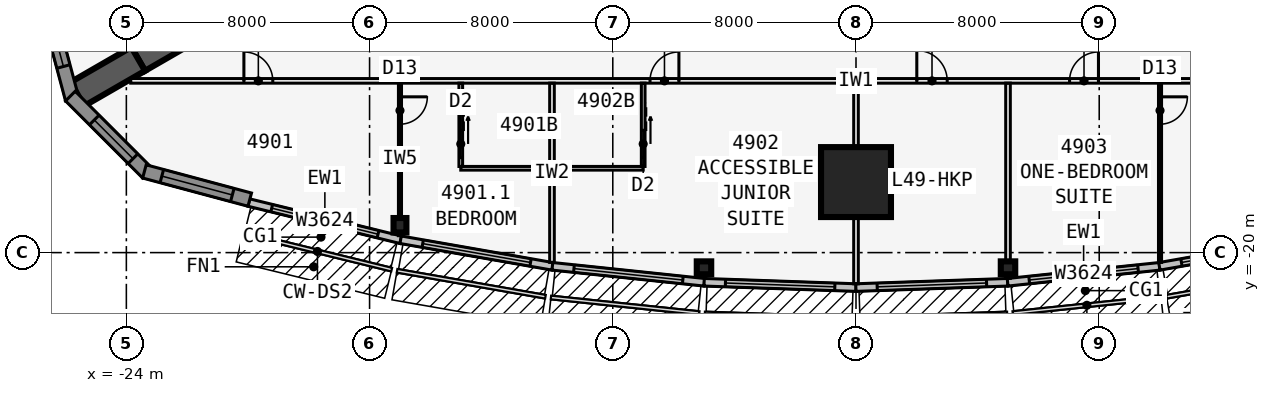
"""IFC4 building model, lengths in metres.
Left out: names, types, materials, properties, quantities, classifications, styles, units other than length and angle.
Written with IfcOpenShell. Run it as: python <this file> out.ifc"""

import sys

from ifc_helpers import new_model, si_unit, direction, frame, frame_2d, origin, origin_2d, place, context, subcontext, project, spatial, polyline, rectangle, i_section, outline, extrude, element, fill, save


model = new_model("IFC4")
c1 = context("Model", 3, precision=1e-05, world=origin(), true_north=direction((0.0, 1.0)))
c2 = subcontext(c1, "Body", "Model", "MODEL_VIEW")
j1 = project(units=[si_unit("LENGTHUNIT", "METRE"), si_unit("PLANEANGLEUNIT", "RADIAN")], contexts=[c1])
p1 = place(None, origin())
s1 = spatial("IfcSite", under=j1, at=p1, CompositionType="ELEMENT")
p2 = place(p1, origin())
s2 = spatial("IfcBuilding", under=s1, at=p2, CompositionType="ELEMENT")
p3 = place(p2, frame((0.0, 0.0, 182.7)))
s3 = spatial("IfcBuildingStorey", under=s2, at=p3, CompositionType="ELEMENT", Elevation=182.7)
for number, where, z_axis, x_axis in (
    (1, (-21.61, -12.477, 0.0), (0.0, 0.0, 1.0), (-0.866, -0.5, 0.0)),
    (2, (-23.61, -13.631, 0.0), (0.0, 0.0, 1.0), (-0.866, -0.5, 0.0)),
):
    element("IfcWall", number, at=place(p3, frame(where, z_axis=z_axis, x_axis=x_axis)), inside=s3, PredefinedType="SHEAR", context=c2, shape_type="SweptSolid", body=[
        extrude(rectangle(XDim=2.309, YDim=0.9, at=frame_2d((1.155, 0.0))), origin(), (0.0, 0.0, 1.0), 3.4),
    ])
for number, where, z_axis, x_axis in (
    (3, (-15.0, -19.1, 0.0), (0.0, 0.0, 1.0), (1.0, 0.0, 0.0)),
    (4, (-5.0, -20.5, 0.0), (0.0, 0.0, 1.0), (0.0, -1.0, 0.0)),
    (5, (5.0, -20.5, 0.0), (0.0, 0.0, 1.0), (0.0, -1.0, 0.0)),
):
    element("IfcColumn", number, at=place(p3, frame(where, z_axis=z_axis, x_axis=x_axis)), inside=s3, PredefinedType="COLUMN", context=c2, shape_type="SweptSolid", body=[
        extrude(i_section(OverallWidth=0.424, OverallDepth=0.475, WebThickness=0.048, FlangeThickness=0.077, at=origin_2d()), origin(), (0.0, 0.0, 1.0), 3.4),
    ])
p4 = place(p3, frame((0.0, -17.68, 0.0), z_axis=(0.0, 0.0, 1.0), x_axis=(0.0, -1.0, 0.0)))
e6 = element("IfcColumn", 6, at=p4, inside=s3, PredefinedType="COLUMN", context=c2, shape_type="SweptSolid", body=[
    extrude(rectangle(XDim=2.3, YDim=2.3, at=origin_2d()), origin(), (0.0, 0.0, 1.0), 3.4),
])
p5 = place(p3, frame((-19.97, -18.354, 0.0), z_axis=(0.0, 0.0, 1.0), x_axis=(0.971270024053, -0.237980126011, 0.0)))
e7 = element("IfcWall", 7, at=p5, inside=s3, PredefinedType="STANDARD", context=c2, shape_type="SweptSolid", body=[
    extrude(rectangle(XDim=5.148, YDim=0.25, at=frame_2d((2.574, 0.0))), origin(), (0.0, 0.0, 1.0), 3.235),
])
p6 = place(p5, frame((0.774, 0.0, 0.45)))
e8 = element("IfcOpeningElement", 8, at=p6, cuts=e7, PredefinedType="OPENING", context=c2, shape_type="SweptSolid", body=[
    extrude(rectangle(XDim=3.6, YDim=2.4, at=frame_2d((1.8, 1.2))), frame((0.0, 0.135, 0.0), z_axis=(0.0, -1.0, 0.0), x_axis=(1.0, 0.0, 0.0)), (0.0, 0.0, 1.0), 0.27),
])
p7 = place(p3, frame((-14.979, -19.577, 0.0), z_axis=(0.0, 0.0, 1.0), x_axis=(0.985030467156, -0.172380331752, 0.0)))
e9 = element("IfcWall", 9, at=p7, inside=s3, PredefinedType="STANDARD", context=c2, shape_type="SweptSolid", body=[
    extrude(rectangle(XDim=5.076, YDim=0.25, at=frame_2d((2.538, 0.0))), origin(), (0.0, 0.0, 1.0), 3.235),
])
p8 = place(p7, frame((0.738, 0.0, 0.45)))
e10 = element("IfcOpeningElement", 10, at=p8, cuts=e9, PredefinedType="OPENING", context=c2, shape_type="SweptSolid", body=[
    extrude(rectangle(XDim=3.6, YDim=2.4, at=frame_2d((1.8, 1.2))), frame((0.0, 0.135, 0.0), z_axis=(0.0, -1.0, 0.0), x_axis=(1.0, 0.0, 0.0)), (0.0, 0.0, 1.0), 0.27),
])
p9 = place(p3, frame((-9.987, -20.451, 0.0), z_axis=(0.0, 0.0, 1.0), x_axis=(0.994534683851, -0.104406717299, 0.0)))
e11 = element("IfcWall", 11, at=p9, inside=s3, PredefinedType="STANDARD", context=c2, shape_type="SweptSolid", body=[
    extrude(rectangle(XDim=5.028, YDim=0.25, at=frame_2d((2.514, 0.0))), origin(), (0.0, 0.0, 1.0), 3.235),
])
p10 = place(p9, frame((0.714, 0.0, 0.45)))
e12 = element("IfcOpeningElement", 12, at=p10, cuts=e11, PredefinedType="OPENING", context=c2, shape_type="SweptSolid", body=[
    extrude(rectangle(XDim=3.6, YDim=2.4, at=frame_2d((1.8, 1.2))), frame((0.0, 0.135, 0.0), z_axis=(0.0, -1.0, 0.0), x_axis=(1.0, 0.0, 0.0)), (0.0, 0.0, 1.0), 0.27),
])
p11 = place(p3, frame((-4.996, -20.975, 0.0), z_axis=(0.0, 0.0, 1.0), x_axis=(0.999387720943, -0.034988329879, 0.0)))
e13 = element("IfcWall", 13, at=p11, inside=s3, PredefinedType="STANDARD", context=c2, shape_type="SweptSolid", body=[
    extrude(rectangle(XDim=5.003, YDim=0.25, at=frame_2d((2.501, 0.0))), origin(), (0.0, 0.0, 1.0), 3.235),
])
p12 = place(p11, frame((0.701, 0.0, 0.45)))
e14 = element("IfcOpeningElement", 14, at=p12, cuts=e13, PredefinedType="OPENING", context=c2, shape_type="SweptSolid", body=[
    extrude(rectangle(XDim=3.6, YDim=2.4, at=frame_2d((1.8, 1.2))), frame((0.0, 0.135, 0.0), z_axis=(0.0, -1.0, 0.0), x_axis=(1.0, 0.0, 0.0)), (0.0, 0.0, 1.0), 0.27),
])
p13 = place(p3, frame((-0.004, -21.15, 0.0), z_axis=(0.0, 0.0, 1.0), x_axis=(0.999387720943, 0.034988329879, 0.0)))
e15 = element("IfcWall", 15, at=p13, inside=s3, PredefinedType="STANDARD", context=c2, shape_type="SweptSolid", body=[
    extrude(rectangle(XDim=5.003, YDim=0.25, at=frame_2d((2.501, 0.0))), origin(), (0.0, 0.0, 1.0), 3.235),
])
p14 = place(p13, frame((0.701, 0.0, 0.45)))
e16 = element("IfcOpeningElement", 16, at=p14, cuts=e15, PredefinedType="OPENING", context=c2, shape_type="SweptSolid", body=[
    extrude(rectangle(XDim=3.6, YDim=2.4, at=frame_2d((1.8, 1.2))), frame((0.0, 0.135, 0.0), z_axis=(0.0, -1.0, 0.0), x_axis=(1.0, 0.0, 0.0)), (0.0, 0.0, 1.0), 0.27),
])
p15 = place(p3, frame((4.987, -20.976, 0.0), z_axis=(0.0, 0.0, 1.0), x_axis=(0.994534683851, 0.104406717299, 0.0)))
e17 = element("IfcWall", 17, at=p15, inside=s3, PredefinedType="STANDARD", context=c2, shape_type="SweptSolid", body=[
    extrude(rectangle(XDim=5.028, YDim=0.25, at=frame_2d((2.514, 0.0))), origin(), (0.0, 0.0, 1.0), 3.235),
])
p16 = place(p15, frame((0.714, 0.0, 0.45)))
e18 = element("IfcOpeningElement", 18, at=p16, cuts=e17, PredefinedType="OPENING", context=c2, shape_type="SweptSolid", body=[
    extrude(rectangle(XDim=3.6, YDim=2.4, at=frame_2d((1.8, 1.2))), frame((0.0, 0.135, 0.0), z_axis=(0.0, -1.0, 0.0), x_axis=(1.0, 0.0, 0.0)), (0.0, 0.0, 1.0), 0.27),
])
p17 = place(p3, frame((9.979, -20.452, 0.0), z_axis=(0.0, 0.0, 1.0), x_axis=(0.985030467156, 0.172380331752, 0.0)))
e19 = element("IfcWall", 19, at=p17, inside=s3, PredefinedType="STANDARD", context=c2, shape_type="SweptSolid", body=[
    extrude(rectangle(XDim=5.076, YDim=0.25, at=frame_2d((2.538, 0.0))), origin(), (0.0, 0.0, 1.0), 3.235),
])
p18 = place(p17, frame((0.738, 0.0, 0.45)))
e20 = element("IfcOpeningElement", 20, at=p18, cuts=e19, PredefinedType="OPENING", context=c2, shape_type="SweptSolid", body=[
    extrude(rectangle(XDim=3.6, YDim=2.4, at=frame_2d((1.8, 1.2))), frame((0.0, 0.135, 0.0), z_axis=(0.0, -1.0, 0.0), x_axis=(1.0, 0.0, 0.0)), (0.0, 0.0, 1.0), 0.27),
])
p19 = place(p3, frame((-26.711, -11.489, 0.0), z_axis=(0.0, 0.0, 1.0), x_axis=(0.258823421857, -0.965924653531, 0.0)))
e21 = element("IfcWall", 21, at=p19, inside=s3, PredefinedType="SOLIDWALL", context=c2, shape_type="SweptSolid", body=[
    extrude(outline(polyline([(3.586, 0.225), (3.527, 0.225), (3.035, 0.093), (3.0, 0.225), (0.0, 0.225), (0.0, -0.225), (3.586, -0.225), (3.586, 0.225)])), origin(), (0.0, 0.0, 1.0), 3.235),
])
p20 = place(p19, frame((0.675, 0.0, 0.45)))
e22 = element("IfcOpeningElement", 22, at=p20, cuts=e21, PredefinedType="OPENING", context=c2, shape_type="SweptSolid", body=[
    extrude(rectangle(XDim=1.8, YDim=2.4, at=frame_2d((0.9, 1.2))), frame((0.0, 0.235, 0.0), z_axis=(0.0, -1.0, 0.0), x_axis=(1.0, 0.0, 0.0)), (0.0, 0.0, 1.0), 0.47),
])
p21 = place(p3, frame((-25.841, -14.852, 0.0), z_axis=(0.0, 0.0, 1.0), x_axis=(0.707106781187, -0.707106781187, 0.0)))
e23 = element("IfcWall", 23, at=p21, inside=s3, PredefinedType="SOLIDWALL", context=c2, shape_type="SweptSolid", body=[
    extrude(outline(polyline([(3.586, 0.225), (0.586, 0.225), (0.551, 0.093), (0.059, 0.225), (0.0, 0.225), (0.0, -0.225), (3.586, -0.225), (3.586, 0.225)])), origin(), (0.0, 0.0, 1.0), 3.235),
])
p22 = place(p21, frame((1.111, 0.0, 0.45)))
e24 = element("IfcOpeningElement", 24, at=p22, cuts=e23, PredefinedType="OPENING", context=c2, shape_type="SweptSolid", body=[
    extrude(rectangle(XDim=1.8, YDim=2.4, at=frame_2d((0.9, 1.2))), frame((0.0, 0.235, 0.0), z_axis=(0.0, -1.0, 0.0), x_axis=(1.0, 0.0, 0.0)), (0.0, 0.0, 1.0), 0.47),
])
p23 = place(p3, frame((-23.406, -17.33, 0.0), z_axis=(0.0, 0.0, 1.0), x_axis=(0.965924653531, -0.258823421857, 0.0)))
e25 = element("IfcWall", 25, at=p23, inside=s3, PredefinedType="SOLIDWALL", context=c2, shape_type="SweptSolid", body=[
    extrude(rectangle(XDim=3.586, YDim=0.45, at=frame_2d((1.793, 0.0))), origin(), (0.0, 0.0, 1.0), 3.235),
])
p24 = place(p23, frame((0.593, 0.0, 0.45)))
e26 = element("IfcOpeningElement", 26, at=p24, cuts=e25, PredefinedType="OPENING", context=c2, shape_type="SweptSolid", body=[
    extrude(rectangle(XDim=2.4, YDim=2.4, at=frame_2d((1.2, 1.2))), frame((0.0, 0.235, 0.0), z_axis=(0.0, -1.0, 0.0), x_axis=(1.0, 0.0, 0.0)), (0.0, 0.0, 1.0), 0.47),
])
p25 = place(p3, frame((-23.857, -14.351, 0.0), z_axis=(0.0, 0.0, 1.0), x_axis=(1.0, 0.0, 0.0)))
e27 = element("IfcWall", 27, at=p25, inside=s3, PredefinedType="PARTITIONING", context=c2, shape_type="SweptSolid", body=[
    extrude(rectangle(XDim=47.714, YDim=0.15, at=frame_2d((23.857, 0.0))), origin(), (0.0, 0.0, 1.0), 3.235),
])
p26 = place(p25, frame((3.723, 0.0, 0.0)))
e28 = element("IfcOpeningElement", 28, at=p26, cuts=e27, PredefinedType="OPENING", context=c2, shape_type="SweptSolid", body=[
    extrude(rectangle(XDim=0.95, YDim=2.13, at=frame_2d((0.475, 1.065))), frame((0.0, 0.085, 0.0), z_axis=(0.0, -1.0, 0.0), x_axis=(1.0, 0.0, 0.0)), (0.0, 0.0, 1.0), 0.17),
])
p27 = place(p25, frame((17.082, 0.0, 0.0)))
e29 = element("IfcOpeningElement", 29, at=p27, cuts=e27, PredefinedType="OPENING", context=c2, shape_type="SweptSolid", body=[
    extrude(rectangle(XDim=0.95, YDim=2.13, at=frame_2d((0.475, 1.065))), frame((0.0, 0.085, 0.0), z_axis=(0.0, -1.0, 0.0), x_axis=(1.0, 0.0, 0.0)), (0.0, 0.0, 1.0), 0.17),
])
p28 = place(p25, frame((25.857, 0.0, 0.0)))
e30 = element("IfcOpeningElement", 30, at=p28, cuts=e27, PredefinedType="OPENING", context=c2, shape_type="SweptSolid", body=[
    extrude(rectangle(XDim=1.0, YDim=2.13, at=frame_2d((0.5, 1.065))), frame((0.0, 0.085, 0.0), z_axis=(0.0, -1.0, 0.0), x_axis=(1.0, 0.0, 0.0)), (0.0, 0.0, 1.0), 0.17),
])
p29 = place(p25, frame((30.882, 0.0, 0.0)))
e31 = element("IfcOpeningElement", 31, at=p29, cuts=e27, PredefinedType="OPENING", context=c2, shape_type="SweptSolid", body=[
    extrude(rectangle(XDim=0.95, YDim=2.13, at=frame_2d((0.475, 1.065))), frame((0.0, 0.085, 0.0), z_axis=(0.0, -1.0, 0.0), x_axis=(1.0, 0.0, 0.0)), (0.0, 0.0, 1.0), 0.17),
])
p30 = place(p25, frame((42.082, 0.0, 0.0)))
e32 = element("IfcOpeningElement", 32, at=p30, cuts=e27, PredefinedType="OPENING", context=c2, shape_type="SweptSolid", body=[
    extrude(rectangle(XDim=0.95, YDim=2.13, at=frame_2d((0.475, 1.065))), frame((0.0, 0.085, 0.0), z_axis=(0.0, -1.0, 0.0), x_axis=(1.0, 0.0, 0.0)), (0.0, 0.0, 1.0), 0.17),
])
p31 = place(p3, frame((-15.0, -14.426, 0.0), z_axis=(0.0, 0.0, 1.0), x_axis=(0.0, -1.0, 0.0)))
e33 = element("IfcWall", 33, at=p31, inside=s3, PredefinedType="PARTITIONING", context=c2, shape_type="SweptSolid", body=[
    extrude(rectangle(XDim=5.017, YDim=0.1, at=frame_2d((2.508, 0.0))), origin(), (0.0, 0.0, 1.0), 2.389),
])
p32 = place(p31, frame((0.45, 0.0, 0.0)))
e34 = element("IfcOpeningElement", 34, at=p32, cuts=e33, PredefinedType="OPENING", context=c2, shape_type="SweptSolid", body=[
    extrude(rectangle(XDim=0.9, YDim=2.13, at=frame_2d((0.45, 1.065))), frame((0.0, 0.06, 0.0), z_axis=(0.0, -1.0, 0.0), x_axis=(1.0, 0.0, 0.0)), (0.0, 0.0, 1.0), 0.12),
])
p33 = place(p3, frame((-10.0, -14.426, 0.0), z_axis=(0.0, 0.0, 1.0), x_axis=(0.0, -1.0, 0.0)))
e35 = element("IfcWall", 35, at=p33, inside=s3, PredefinedType="PARTITIONING", context=c2, shape_type="SweptSolid", body=[
    extrude(rectangle(XDim=5.895, YDim=0.15, at=frame_2d((2.948, 0.0))), origin(), (0.0, 0.0, 1.0), 2.389),
])
p34 = place(p3, frame((0.0, -14.426, 0.0), z_axis=(0.0, 0.0, 1.0), x_axis=(0.0, -1.0, 0.0)))
e36 = element("IfcWall", 36, at=p34, inside=s3, PredefinedType="PARTITIONING", context=c2, shape_type="SweptSolid", body=[
    extrude(rectangle(XDim=6.599, YDim=0.15, at=frame_2d((3.299, 0.0))), origin(), (0.0, 0.0, 1.0), 2.389),
])
p35 = place(p3, frame((5.0, -14.426, 0.0), z_axis=(0.0, 0.0, 1.0), x_axis=(0.0, -1.0, 0.0)))
e37 = element("IfcWall", 37, at=p35, inside=s3, PredefinedType="PARTITIONING", context=c2, shape_type="SweptSolid", body=[
    extrude(rectangle(XDim=6.423, YDim=0.15, at=frame_2d((3.211, 0.0))), origin(), (0.0, 0.0, 1.0), 2.389),
])
p36 = place(p3, frame((10.0, -14.426, 0.0), z_axis=(0.0, 0.0, 1.0), x_axis=(0.0, -1.0, 0.0)))
e38 = element("IfcWall", 38, at=p36, inside=s3, PredefinedType="PARTITIONING", context=c2, shape_type="SweptSolid", body=[
    extrude(rectangle(XDim=5.895, YDim=0.1, at=frame_2d((2.948, 0.0))), origin(), (0.0, 0.0, 1.0), 2.389),
])
p37 = place(p36, frame((0.45, 0.0, 0.0)))
e39 = element("IfcOpeningElement", 39, at=p37, cuts=e38, PredefinedType="OPENING", context=c2, shape_type="SweptSolid", body=[
    extrude(rectangle(XDim=0.9, YDim=2.13, at=frame_2d((0.45, 1.065))), frame((0.0, 0.06, 0.0), z_axis=(0.0, -1.0, 0.0), x_axis=(1.0, 0.0, 0.0)), (0.0, 0.0, 1.0), 0.12),
])
p38 = place(p3, frame((-13.0, -17.226, 0.0), z_axis=(0.0, 0.0, 1.0), x_axis=(1.0, 0.0, 0.0)))
e40 = element("IfcWall", 40, at=p38, inside=s3, PredefinedType="PLUMBINGWALL", context=c2, shape_type="SweptSolid", body=[
    extrude(rectangle(XDim=3.0, YDim=0.12, at=frame_2d((1.5, 0.0))), origin(), (0.0, 0.0, 1.0), 3.235),
])
p39 = place(p3, frame((-13.0, -14.426, 0.0), z_axis=(0.0, 0.0, 1.0), x_axis=(0.0, -1.0, 0.0)))
e41 = element("IfcWall", 41, at=p39, inside=s3, PredefinedType="PLUMBINGWALL", context=c2, shape_type="SweptSolid", body=[
    extrude(rectangle(XDim=2.74, YDim=0.12, at=frame_2d((1.37, 0.0))), origin(), (0.0, 0.0, 1.0), 3.235),
])
p40 = place(p39, frame((1.55, 0.0, 0.0)))
e42 = element("IfcOpeningElement", 42, at=p40, cuts=e41, PredefinedType="OPENING", context=c2, shape_type="SweptSolid", body=[
    extrude(rectangle(XDim=0.9, YDim=2.13, at=frame_2d((0.45, 1.065))), frame((0.0, 0.07, 0.0), z_axis=(0.0, -1.0, 0.0), x_axis=(1.0, 0.0, 0.0)), (0.0, 0.0, 1.0), 0.14),
])
p41 = place(p3, frame((-10.0, -17.226, 0.0), z_axis=(0.0, 0.0, 1.0), x_axis=(1.0, 0.0, 0.0)))
e43 = element("IfcWall", 43, at=p41, inside=s3, PredefinedType="PLUMBINGWALL", context=c2, shape_type="SweptSolid", body=[
    extrude(rectangle(XDim=3.0, YDim=0.12, at=frame_2d((1.5, 0.0))), origin(), (0.0, 0.0, 1.0), 3.235),
])
p42 = place(p3, frame((-7.0, -14.426, 0.0), z_axis=(0.0, 0.0, 1.0), x_axis=(0.0, -1.0, 0.0)))
e44 = element("IfcWall", 44, at=p42, inside=s3, PredefinedType="PLUMBINGWALL", context=c2, shape_type="SweptSolid", body=[
    extrude(rectangle(XDim=2.74, YDim=0.12, at=frame_2d((1.37, 0.0))), origin(), (0.0, 0.0, 1.0), 3.235),
])
p43 = place(p42, frame((1.55, 0.0, 0.0)))
e45 = element("IfcOpeningElement", 45, at=p43, cuts=e44, PredefinedType="OPENING", context=c2, shape_type="SweptSolid", body=[
    extrude(rectangle(XDim=0.9, YDim=2.13, at=frame_2d((0.45, 1.065))), frame((0.0, 0.07, 0.0), z_axis=(0.0, -1.0, 0.0), x_axis=(1.0, 0.0, 0.0)), (0.0, 0.0, 1.0), 0.14),
])
p44 = place(p6, origin())
e46 = element("IfcWindow", 46, at=p44, inside=s3, PartitioningType="SINGLE_PANEL", PredefinedType="WINDOW", context=c2, shape_type="SweptSolid", body=[
    extrude(rectangle(XDim=3.6, YDim=2.4, at=frame_2d((1.8, 1.2))), frame((0.0, 0.03, 0.0), z_axis=(0.0, -1.0, 0.0), x_axis=(1.0, 0.0, 0.0)), (0.0, 0.0, 1.0), 0.06),
])
fill(e8, e46)
p45 = place(p8, origin())
e47 = element("IfcWindow", 47, at=p45, inside=s3, PartitioningType="SINGLE_PANEL", PredefinedType="WINDOW", context=c2, shape_type="SweptSolid", body=[
    extrude(rectangle(XDim=3.6, YDim=2.4, at=frame_2d((1.8, 1.2))), frame((0.0, 0.03, 0.0), z_axis=(0.0, -1.0, 0.0), x_axis=(1.0, 0.0, 0.0)), (0.0, 0.0, 1.0), 0.06),
])
fill(e10, e47)
p46 = place(p10, origin())
e48 = element("IfcWindow", 48, at=p46, inside=s3, PartitioningType="SINGLE_PANEL", PredefinedType="WINDOW", context=c2, shape_type="SweptSolid", body=[
    extrude(rectangle(XDim=3.6, YDim=2.4, at=frame_2d((1.8, 1.2))), frame((0.0, 0.03, 0.0), z_axis=(0.0, -1.0, 0.0), x_axis=(1.0, 0.0, 0.0)), (0.0, 0.0, 1.0), 0.06),
])
fill(e12, e48)
p47 = place(p12, origin())
e49 = element("IfcWindow", 49, at=p47, inside=s3, PartitioningType="SINGLE_PANEL", PredefinedType="WINDOW", context=c2, shape_type="SweptSolid", body=[
    extrude(rectangle(XDim=3.6, YDim=2.4, at=frame_2d((1.8, 1.2))), frame((0.0, 0.03, 0.0), z_axis=(0.0, -1.0, 0.0), x_axis=(1.0, 0.0, 0.0)), (0.0, 0.0, 1.0), 0.06),
])
fill(e14, e49)
p48 = place(p14, origin())
e50 = element("IfcWindow", 50, at=p48, inside=s3, PartitioningType="SINGLE_PANEL", PredefinedType="WINDOW", context=c2, shape_type="SweptSolid", body=[
    extrude(rectangle(XDim=3.6, YDim=2.4, at=frame_2d((1.8, 1.2))), frame((0.0, 0.03, 0.0), z_axis=(0.0, -1.0, 0.0), x_axis=(1.0, 0.0, 0.0)), (0.0, 0.0, 1.0), 0.06),
])
fill(e16, e50)
p49 = place(p16, origin())
e51 = element("IfcWindow", 51, at=p49, inside=s3, PartitioningType="SINGLE_PANEL", PredefinedType="WINDOW", context=c2, shape_type="SweptSolid", body=[
    extrude(rectangle(XDim=3.6, YDim=2.4, at=frame_2d((1.8, 1.2))), frame((0.0, 0.03, 0.0), z_axis=(0.0, -1.0, 0.0), x_axis=(1.0, 0.0, 0.0)), (0.0, 0.0, 1.0), 0.06),
])
fill(e18, e51)
p50 = place(p18, origin())
e52 = element("IfcWindow", 52, at=p50, inside=s3, PartitioningType="SINGLE_PANEL", PredefinedType="WINDOW", context=c2, shape_type="SweptSolid", body=[
    extrude(rectangle(XDim=3.6, YDim=2.4, at=frame_2d((1.8, 1.2))), frame((0.0, 0.03, 0.0), z_axis=(0.0, -1.0, 0.0), x_axis=(1.0, 0.0, 0.0)), (0.0, 0.0, 1.0), 0.06),
])
fill(e20, e52)
p51 = place(p20, origin())
e53 = element("IfcWindow", 53, at=p51, inside=s3, PartitioningType="SINGLE_PANEL", PredefinedType="WINDOW", context=c2, shape_type="SweptSolid", body=[
    extrude(rectangle(XDim=1.8, YDim=2.4, at=frame_2d((0.9, 1.2))), frame((0.0, 0.03, 0.0), z_axis=(0.0, -1.0, 0.0), x_axis=(1.0, 0.0, 0.0)), (0.0, 0.0, 1.0), 0.06),
])
fill(e22, e53)
p52 = place(p22, origin())
e54 = element("IfcWindow", 54, at=p52, inside=s3, PartitioningType="SINGLE_PANEL", PredefinedType="WINDOW", context=c2, shape_type="SweptSolid", body=[
    extrude(rectangle(XDim=1.8, YDim=2.4, at=frame_2d((0.9, 1.2))), frame((0.0, 0.03, 0.0), z_axis=(0.0, -1.0, 0.0), x_axis=(1.0, 0.0, 0.0)), (0.0, 0.0, 1.0), 0.06),
])
fill(e24, e54)
p53 = place(p24, origin())
e55 = element("IfcWindow", 55, at=p53, inside=s3, PartitioningType="SINGLE_PANEL", PredefinedType="WINDOW", context=c2, shape_type="SweptSolid", body=[
    extrude(rectangle(XDim=2.4, YDim=2.4, at=frame_2d((1.2, 1.2))), frame((0.0, 0.03, 0.0), z_axis=(0.0, -1.0, 0.0), x_axis=(1.0, 0.0, 0.0)), (0.0, 0.0, 1.0), 0.06),
])
fill(e26, e55)
p54 = place(p32, origin())
e56 = element("IfcDoor", 56, at=p54, inside=s3, OperationType="SINGLE_SWING_LEFT", PredefinedType="DOOR", context=c2, shape_type="SweptSolid", body=[
    extrude(rectangle(XDim=0.9, YDim=2.13, at=frame_2d((0.45, 1.065))), frame((0.0, 0.025, 0.0), z_axis=(0.0, -1.0, 0.0), x_axis=(1.0, 0.0, 0.0)), (0.0, 0.0, 1.0), 0.05),
])
fill(e34, e56)
p55 = place(p37, origin())
e57 = element("IfcDoor", 57, at=p55, inside=s3, OperationType="SINGLE_SWING_LEFT", PredefinedType="DOOR", context=c2, shape_type="SweptSolid", body=[
    extrude(rectangle(XDim=0.9, YDim=2.13, at=frame_2d((0.45, 1.065))), frame((0.0, 0.025, 0.0), z_axis=(0.0, -1.0, 0.0), x_axis=(1.0, 0.0, 0.0)), (0.0, 0.0, 1.0), 0.05),
])
fill(e39, e57)
p56 = place(p26, origin())
e58 = element("IfcDoor", 58, at=p56, inside=s3, OperationType="SINGLE_SWING_LEFT", PredefinedType="DOOR", context=c2, shape_type="SweptSolid", body=[
    extrude(rectangle(XDim=0.95, YDim=2.13, at=frame_2d((0.475, 1.065))), frame((0.0, 0.025, 0.0), z_axis=(0.0, -1.0, 0.0), x_axis=(1.0, 0.0, 0.0)), (0.0, 0.0, 1.0), 0.05),
])
fill(e28, e58)
p57 = place(p40, origin())
e59 = element("IfcDoor", 59, at=p57, inside=s3, OperationType="SLIDING_TO_LEFT", PredefinedType="DOOR", context=c2, shape_type="SweptSolid", body=[
    extrude(rectangle(XDim=0.9, YDim=2.13, at=frame_2d((0.45, 1.065))), frame((0.0, 0.025, 0.0), z_axis=(0.0, -1.0, 0.0), x_axis=(1.0, 0.0, 0.0)), (0.0, 0.0, 1.0), 0.05),
])
fill(e42, e59)
p58 = place(p43, origin())
e60 = element("IfcDoor", 60, at=p58, inside=s3, OperationType="SLIDING_TO_LEFT", PredefinedType="DOOR", context=c2, shape_type="SweptSolid", body=[
    extrude(rectangle(XDim=0.9, YDim=2.13, at=frame_2d((0.45, 1.065))), frame((0.0, 0.025, 0.0), z_axis=(0.0, -1.0, 0.0), x_axis=(1.0, 0.0, 0.0)), (0.0, 0.0, 1.0), 0.05),
])
fill(e45, e60)
p59 = place(p27, origin())
e61 = element("IfcDoor", 61, at=p59, inside=s3, OperationType="SINGLE_SWING_RIGHT", PredefinedType="DOOR", context=c2, shape_type="SweptSolid", body=[
    extrude(rectangle(XDim=0.95, YDim=2.13, at=frame_2d((0.475, 1.065))), frame((0.0, 0.025, 0.0), z_axis=(0.0, -1.0, 0.0), x_axis=(1.0, 0.0, 0.0)), (0.0, 0.0, 1.0), 0.05),
])
fill(e29, e61)
p60 = place(p28, origin())
e62 = element("IfcDoor", 62, at=p60, inside=s3, OperationType="SINGLE_SWING_LEFT", PredefinedType="DOOR", context=c2, shape_type="SweptSolid", body=[
    extrude(rectangle(XDim=1.0, YDim=2.13, at=frame_2d((0.5, 1.065))), frame((0.0, 0.025, 0.0), z_axis=(0.0, -1.0, 0.0), x_axis=(1.0, 0.0, 0.0)), (0.0, 0.0, 1.0), 0.05),
])
fill(e30, e62)
p61 = place(p29, origin())
e63 = element("IfcDoor", 63, at=p61, inside=s3, OperationType="SINGLE_SWING_RIGHT", PredefinedType="DOOR", context=c2, shape_type="SweptSolid", body=[
    extrude(rectangle(XDim=0.95, YDim=2.13, at=frame_2d((0.475, 1.065))), frame((0.0, 0.025, 0.0), z_axis=(0.0, -1.0, 0.0), x_axis=(1.0, 0.0, 0.0)), (0.0, 0.0, 1.0), 0.05),
])
fill(e31, e63)
save(model, sys.argv[1])
